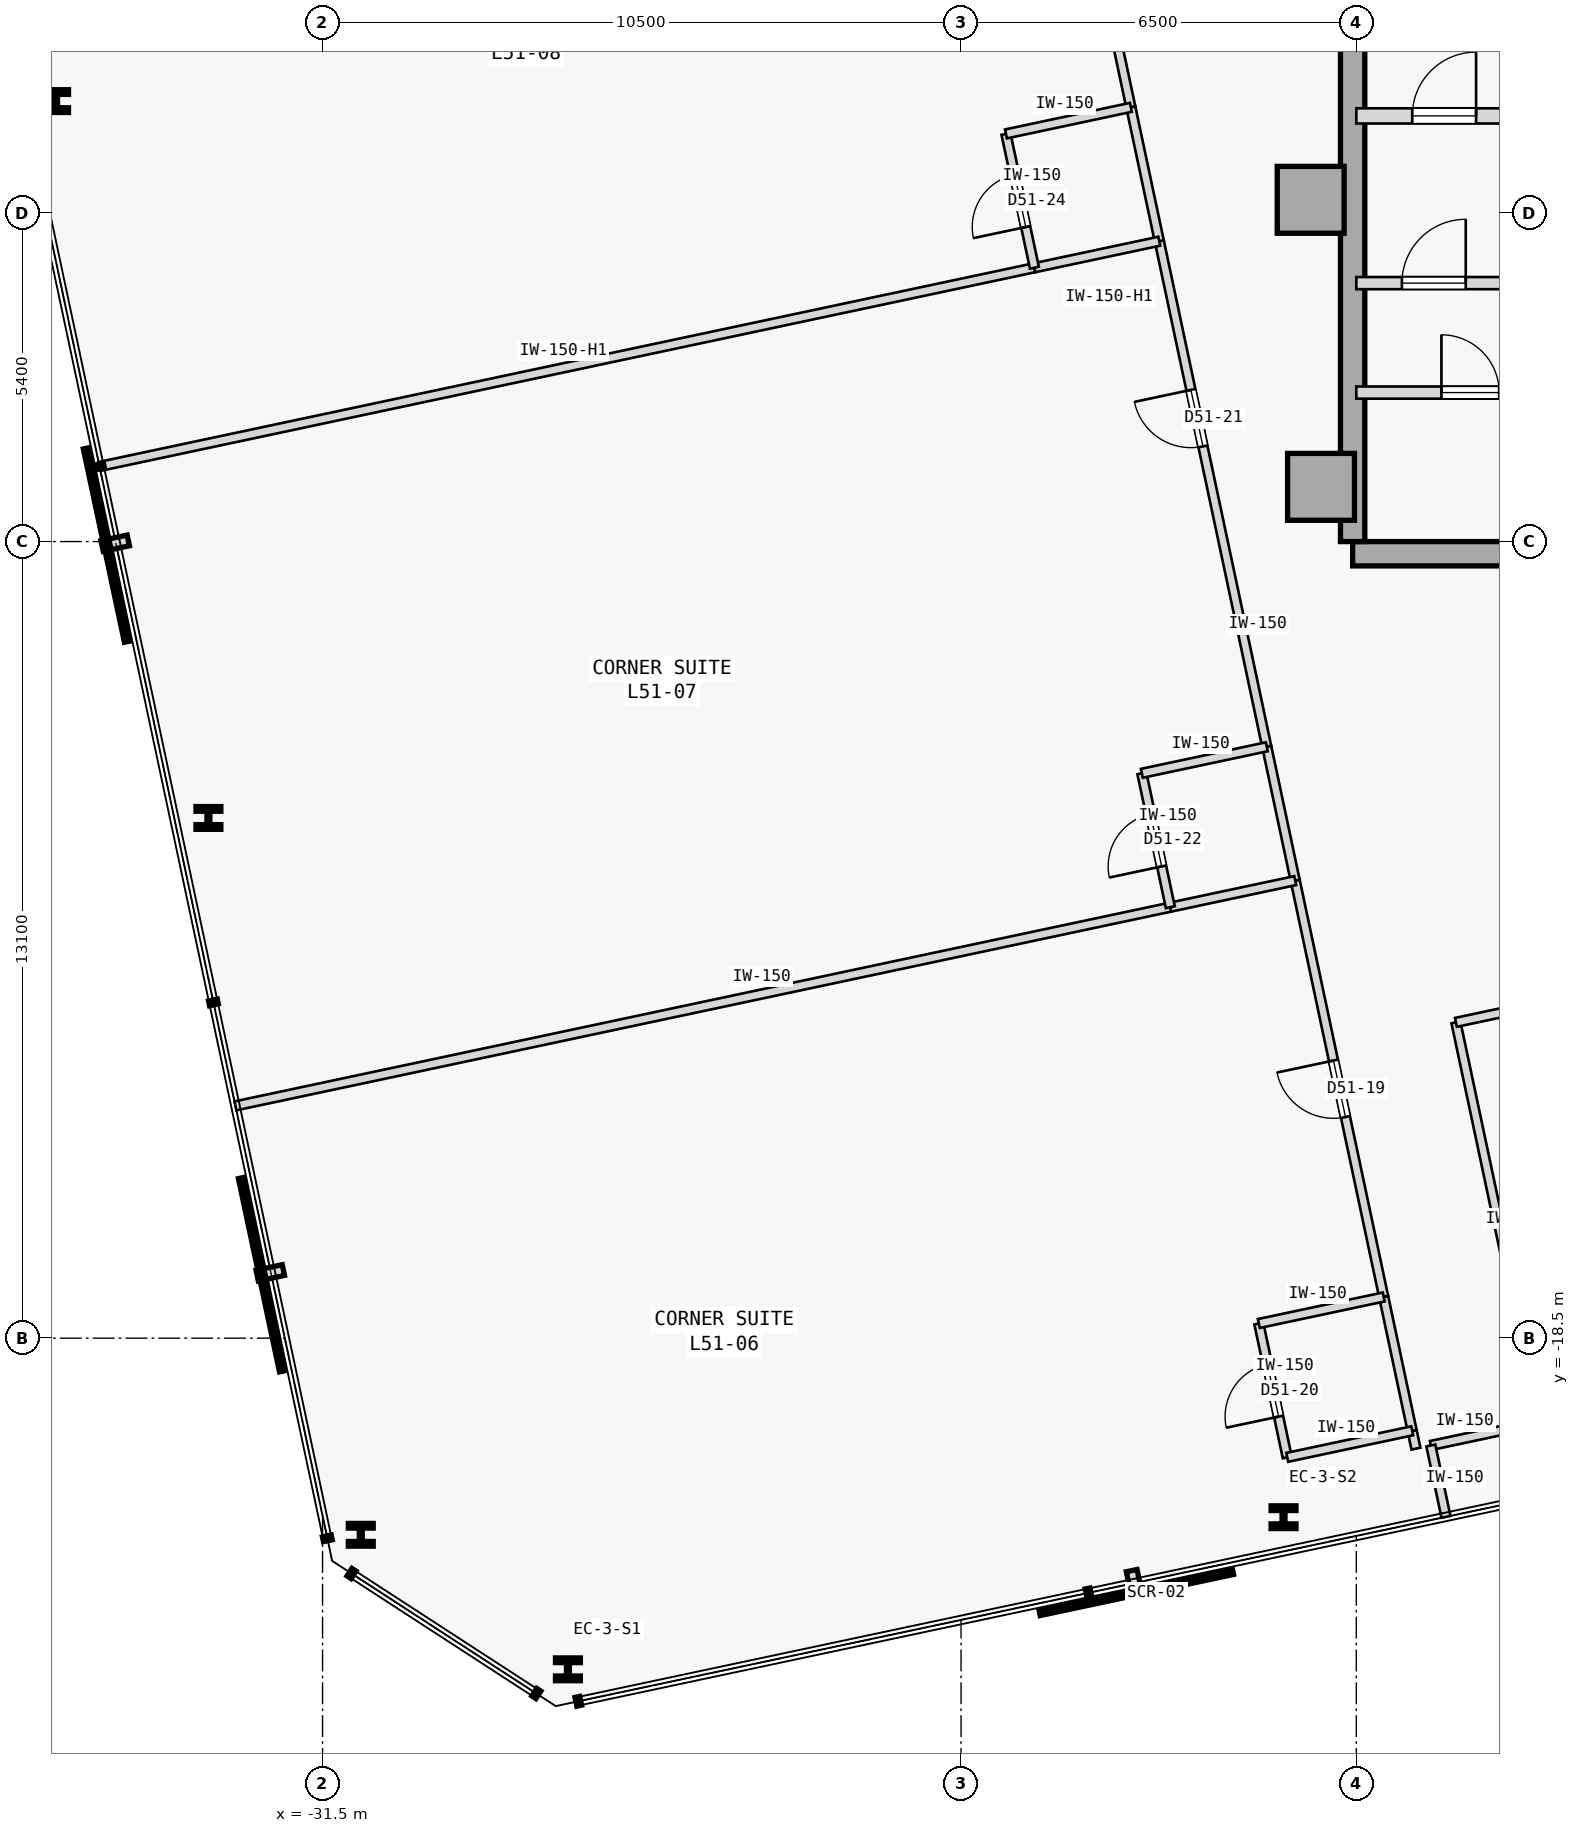
"""IFC4 building model, lengths in metres.
Left out: names, types, materials, properties, quantities, classifications, styles, units other than length and angle.
Written with IfcOpenShell. Run it as: python <this file> out.ifc"""

import sys

from ifc_helpers import new_model, si_unit, direction, frame, frame_2d, origin, origin_2d, place, context, subcontext, project, spatial, rectangle, i_section, extrude, element, fill, save


model = new_model("IFC4")
c1 = context("Model", 3, precision=1e-05, world=origin(), true_north=direction((0.0, 1.0)))
c2 = subcontext(c1, "Body", "Model", "MODEL_VIEW")
j1 = project(units=[si_unit("LENGTHUNIT", "METRE"), si_unit("PLANEANGLEUNIT", "RADIAN")], contexts=[c1])
p1 = place(None, origin())
s1 = spatial("IfcSite", under=j1, at=p1, CompositionType="ELEMENT")
p2 = place(p1, origin())
s2 = spatial("IfcBuilding", under=s1, at=p2, CompositionType="ELEMENT")
p3 = place(p2, frame((0.0, 0.0, 195.6)))
s3 = spatial("IfcBuildingStorey", under=s2, at=p3, CompositionType="ELEMENT", Elevation=195.6)
for number, where, z_axis, x_axis in (
    (1, (-15.25, 0.22, 0.0), (0.0, 0.0, 1.0), (1.0, 0.0, 0.0)),
    (2, (-15.08, -4.5, 0.0), (0.0, 0.0, 1.0), (1.0, 0.0, 0.0)),
):
    element("IfcColumn", number, at=place(p3, frame(where, z_axis=z_axis, x_axis=x_axis)), inside=s3, PredefinedType="COLUMN", context=c2, shape_type="SweptSolid", body=[
        extrude(rectangle(XDim=1.1, YDim=1.1, at=origin_2d()), origin(), (0.0, 0.0, 1.0), 3.4),
    ])
p4 = place(p3, frame((-14.56, -5.6, 0.0), z_axis=(0.0, 0.0, 1.0), x_axis=(1.0, 0.0, 0.0)))
e3 = element("IfcWall", 3, at=p4, inside=s3, PredefinedType="SHEAR", context=c2, shape_type="SweptSolid", body=[
    extrude(rectangle(XDim=10.86, YDim=0.4, at=frame_2d((5.43, 0.0))), origin(), (0.0, 0.0, 1.0), 3.175),
])
p5 = place(p3, frame((-14.56, -5.4, 0.0), z_axis=(0.0, 0.0, 1.0), x_axis=(0.0, 1.0, 0.0)))
e4 = element("IfcWall", 4, at=p5, inside=s3, PredefinedType="SHEAR", context=c2, shape_type="SweptSolid", body=[
    extrude(rectangle(XDim=10.8, YDim=0.4, at=frame_2d((5.4, 0.0))), origin(), (0.0, 0.0, 1.0), 3.175),
])
for number, where, z_axis, x_axis in (
    (5, (-27.465, -23.946, 0.0), (0.0, 0.0, 1.0), (1.0, 0.0, 0.0)),
    (6, (-15.697, -21.444, 0.0), (0.0, 0.0, 1.0), (1.0, 0.0, 0.0)),
    (7, (-35.883, 1.844, 0.0), (0.0, 0.0, 1.0), (1.0, 0.0, 0.0)),
    (8, (-33.377, -9.945, 0.0), (0.0, 0.0, 1.0), (1.0, 0.0, 0.0)),
    (9, (-30.871, -21.733, 0.0), (0.0, 0.0, 1.0), (1.0, 0.0, 0.0)),
):
    element("IfcColumn", number, at=place(p3, frame(where, z_axis=z_axis, x_axis=x_axis)), inside=s3, PredefinedType="COLUMN", context=c2, shape_type="SweptSolid", body=[
        extrude(i_section(OverallWidth=0.409, OverallDepth=0.374, WebThickness=0.048, FlangeThickness=0.077, FilletRadius=0.015, at=origin_2d()), origin(), (0.0, 0.0, 1.0), 3.4),
    ])
p6 = place(p3, frame((-14.5, 1.6, 0.0), z_axis=(0.0, 0.0, 1.0), x_axis=(1.0, 0.0, 0.0)))
e10 = element("IfcWall", 10, at=p6, inside=s3, PredefinedType="STANDARD", context=c2, shape_type="SweptSolid", body=[
    extrude(rectangle(XDim=3.6, YDim=0.25, at=frame_2d((1.8, 0.0))), origin(), (0.0, 0.0, 1.0), 3.175),
])
p7 = place(p6, frame((0.92, 0.0, 0.0)))
e11 = element("IfcOpeningElement", 11, at=p7, cuts=e10, PredefinedType="OPENING", context=c2, shape_type="SweptSolid", body=[
    extrude(rectangle(XDim=1.05, YDim=2.15, at=frame_2d((0.525, 1.075))), frame((0.0, 0.135, 0.0), z_axis=(0.0, -1.0, 0.0), x_axis=(1.0, 0.0, 0.0)), (0.0, 0.0, 1.0), 0.27),
])
p8 = place(p3, frame((-14.5, -1.15, 0.0), z_axis=(0.0, 0.0, 1.0), x_axis=(1.0, 0.0, 0.0)))
e12 = element("IfcWall", 12, at=p8, inside=s3, PredefinedType="STANDARD", context=c2, shape_type="SweptSolid", body=[
    extrude(rectangle(XDim=2.95, YDim=0.2, at=frame_2d((1.475, 0.0))), origin(), (0.0, 0.0, 1.0), 3.175),
])
p9 = place(p8, frame((0.75, 0.0, 0.0)))
e13 = element("IfcOpeningElement", 13, at=p9, cuts=e12, PredefinedType="OPENING", context=c2, shape_type="SweptSolid", body=[
    extrude(rectangle(XDim=1.05, YDim=2.18, at=frame_2d((0.525, 1.09))), frame((0.0, 0.11, 0.0), z_axis=(0.0, -1.0, 0.0), x_axis=(1.0, 0.0, 0.0)), (0.0, 0.0, 1.0), 0.22),
])
p10 = place(p3, frame((-14.5, -2.95, 0.0), z_axis=(0.0, 0.0, 1.0), x_axis=(1.0, 0.0, 0.0)))
e14 = element("IfcWall", 14, at=p10, inside=s3, PredefinedType="STANDARD", context=c2, shape_type="SweptSolid", body=[
    extrude(rectangle(XDim=10.8, YDim=0.2, at=frame_2d((5.4, 0.0))), origin(), (0.0, 0.0, 1.0), 3.175),
])
p11 = place(p10, frame((4.85, 0.0, 0.0)))
e15 = element("IfcOpeningElement", 15, at=p11, cuts=e14, PredefinedType="OPENING", context=c2, shape_type="SweptSolid", body=[
    extrude(rectangle(XDim=1.1, YDim=2.15, at=frame_2d((0.55, 1.075))), frame((0.0, 0.11, 0.0), z_axis=(0.0, -1.0, 0.0), x_axis=(1.0, 0.0, 0.0)), (0.0, 0.0, 1.0), 0.22),
])
p12 = place(p10, frame((7.01, 0.0, 0.0)))
e16 = element("IfcOpeningElement", 16, at=p12, cuts=e14, PredefinedType="OPENING", context=c2, shape_type="SweptSolid", body=[
    extrude(rectangle(XDim=1.1, YDim=2.15, at=frame_2d((0.55, 1.075))), frame((0.0, 0.11, 0.0), z_axis=(0.0, -1.0, 0.0), x_axis=(1.0, 0.0, 0.0)), (0.0, 0.0, 1.0), 0.22),
])
p13 = place(p10, frame((1.4, 0.0, 0.0)))
e17 = element("IfcOpeningElement", 17, at=p13, cuts=e14, PredefinedType="OPENING", context=c2, shape_type="SweptSolid", body=[
    extrude(rectangle(XDim=0.95, YDim=2.15, at=frame_2d((0.475, 1.075))), frame((0.0, 0.11, 0.0), z_axis=(0.0, -1.0, 0.0), x_axis=(1.0, 0.0, 0.0)), (0.0, 0.0, 1.0), 0.22),
])
p14 = place(p3, frame((-13.274, -20.265, 0.0), z_axis=(0.0, 0.0, 1.0), x_axis=(0.978160192495, 0.207852442415, 0.0)))
e18 = element("IfcWall", 18, at=p14, inside=s3, PredefinedType="PARTITIONING", context=c2, shape_type="SweptSolid", body=[
    extrude(rectangle(XDim=1.85, YDim=0.15, at=frame_2d((0.925, 0.0))), origin(), (0.0, 0.0, 1.0), 3.175),
])
p15 = place(p3, frame((-11.465, -19.88, 0.0), z_axis=(0.0, 0.0, 1.0), x_axis=(-0.207916109912, 0.978146661416, 0.0)))
e19 = element("IfcWall", 19, at=p15, inside=s3, PredefinedType="PARTITIONING", context=c2, shape_type="SweptSolid", body=[
    extrude(rectangle(XDim=6.72, YDim=0.15, at=frame_2d((3.36, 0.0))), origin(), (0.0, 0.0, 1.0), 3.175),
])
p16 = place(p3, frame((-12.862, -13.307, 0.0), z_axis=(0.0, 0.0, 1.0), x_axis=(0.978149904805, 0.207900850719, 0.0)))
e20 = element("IfcWall", 20, at=p16, inside=s3, PredefinedType="PARTITIONING", context=c2, shape_type="SweptSolid", body=[
    extrude(rectangle(XDim=9.156, YDim=0.15, at=frame_2d((4.578, 0.0))), origin(), (0.0, 0.0, 1.0), 3.175),
])
p17 = place(p16, frame((4.118, 0.0, 0.0)))
e21 = element("IfcOpeningElement", 21, at=p17, cuts=e20, PredefinedType="OPENING", context=c2, shape_type="SweptSolid", body=[
    extrude(rectangle(XDim=0.92, YDim=2.15, at=frame_2d((0.46, 1.075))), frame((0.0, 0.085, 0.0), z_axis=(0.0, -1.0, 0.0), x_axis=(1.0, 0.0, 0.0)), (0.0, 0.0, 1.0), 0.17),
])
p18 = place(p3, frame((-13.519, -20.317, 0.0), z_axis=(0.0, 0.0, 1.0), x_axis=(-0.207527808066, 0.978229118806, 0.0)))
e22 = element("IfcWall", 22, at=p18, inside=s3, PredefinedType="PARTITIONING", context=c2, shape_type="SweptSolid", body=[
    extrude(rectangle(XDim=0.3, YDim=0.15, at=frame_2d((0.15, 0.0))), origin(), (0.0, 0.0, 1.0), 3.175),
])
p19 = place(p3, frame((-14.049, -17.823, 0.0), z_axis=(0.0, 0.0, 1.0), x_axis=(-0.207940096132, 0.978141562567, 0.0)))
e23 = element("IfcWall", 23, at=p19, inside=s3, PredefinedType="PARTITIONING", context=c2, shape_type="SweptSolid", body=[
    extrude(rectangle(XDim=7.0, YDim=0.15, at=frame_2d((3.5, 0.0))), origin(), (0.0, 0.0, 1.0), 3.175),
])
p20 = place(p19, frame((3.025, 0.0, 0.0)))
e24 = element("IfcOpeningElement", 24, at=p20, cuts=e23, PredefinedType="OPENING", context=c2, shape_type="SweptSolid", body=[
    extrude(rectangle(XDim=0.95, YDim=2.15, at=frame_2d((0.475, 1.075))), frame((0.0, 0.085, 0.0), z_axis=(0.0, -1.0, 0.0), x_axis=(1.0, 0.0, 0.0)), (0.0, 0.0, 1.0), 0.17),
])
p21 = place(p3, frame((-13.581, -20.023, 0.0), z_axis=(0.0, 0.0, 1.0), x_axis=(-0.207891197838, 0.978151956427, 0.0)))
e25 = element("IfcWall", 25, at=p21, inside=s3, PredefinedType="PARTITIONING", context=c2, shape_type="SweptSolid", body=[
    extrude(rectangle(XDim=2.25, YDim=0.15, at=frame_2d((1.125, 0.0))), origin(), (0.0, 0.0, 1.0), 3.175),
])
p22 = place(p3, frame((-15.972, -8.775, 0.0), z_axis=(0.0, 0.0, 1.0), x_axis=(-0.207894825434, 0.97815118543, 0.0)))
e26 = element("IfcWall", 26, at=p22, inside=s3, PredefinedType="PARTITIONING", context=c2, shape_type="SweptSolid", body=[
    extrude(rectangle(XDim=8.5, YDim=0.15, at=frame_2d((4.25, 0.0))), origin(), (0.0, 0.0, 1.0), 3.175),
])
p23 = place(p22, frame((5.05, 0.0, 0.0)))
e27 = element("IfcOpeningElement", 27, at=p23, cuts=e26, PredefinedType="OPENING", context=c2, shape_type="SweptSolid", body=[
    extrude(rectangle(XDim=0.95, YDim=2.15, at=frame_2d((0.475, 1.075))), frame((0.0, 0.085, 0.0), z_axis=(0.0, -1.0, 0.0), x_axis=(1.0, 0.0, 0.0)), (0.0, 0.0, 1.0), 0.17),
])
p24 = place(p3, frame((-15.504, -10.976, 0.0), z_axis=(0.0, 0.0, 1.0), x_axis=(-0.207891197838, 0.978151956427, 0.0)))
e28 = element("IfcWall", 28, at=p24, inside=s3, PredefinedType="PARTITIONING", context=c2, shape_type="SweptSolid", body=[
    extrude(rectangle(XDim=2.25, YDim=0.15, at=frame_2d((1.125, 0.0))), origin(), (0.0, 0.0, 1.0), 3.175),
])
p25 = place(p3, frame((-18.207, 1.74, 0.0), z_axis=(0.0, 0.0, 1.0), x_axis=(-0.207922306475, 0.978145344246, 0.0)))
e29 = element("IfcWall", 29, at=p25, inside=s3, PredefinedType="PARTITIONING", context=c2, shape_type="SweptSolid", body=[
    extrude(rectangle(XDim=8.5, YDim=0.15, at=frame_2d((4.25, 0.0))), origin(), (0.0, 0.0, 1.0), 3.175),
])
p26 = place(p25, frame((3.775, 0.0, 0.0)))
e30 = element("IfcOpeningElement", 30, at=p26, cuts=e29, PredefinedType="OPENING", context=c2, shape_type="SweptSolid", body=[
    extrude(rectangle(XDim=0.95, YDim=2.15, at=frame_2d((0.475, 1.075))), frame((0.0, 0.085, 0.0), z_axis=(0.0, -1.0, 0.0), x_axis=(1.0, 0.0, 0.0)), (0.0, 0.0, 1.0), 0.17),
])
p27 = place(p3, frame((-17.739, -0.46, 0.0), z_axis=(0.0, 0.0, 1.0), x_axis=(-0.207891197838, 0.978151956427, 0.0)))
e31 = element("IfcWall", 31, at=p27, inside=s3, PredefinedType="PARTITIONING", context=c2, shape_type="SweptSolid", body=[
    extrude(rectangle(XDim=2.25, YDim=0.15, at=frame_2d((1.125, 0.0))), origin(), (0.0, 0.0, 1.0), 3.175),
])
p28 = place(p3, frame((-13.025, -21.439, 0.0), z_axis=(0.0, 0.0, 1.0), x_axis=(-0.207917150959, 0.978146440129, 0.0)))
e32 = element("IfcWall", 32, at=p28, inside=s3, PredefinedType="PARTITIONING", context=c2, shape_type="SweptSolid", body=[
    extrude(rectangle(XDim=1.2, YDim=0.15, at=frame_2d((0.6, 0.0))), origin(), (0.0, 0.0, 1.0), 3.175),
])
p29 = place(p3, frame((-15.635, -20.46, 0.0), z_axis=(0.0, 0.0, 1.0), x_axis=(-0.207913264065, 0.978147266328, 0.0)))
e33 = element("IfcWall", 33, at=p29, inside=s3, PredefinedType="PARTITIONING", context=c2, shape_type="SweptSolid", body=[
    extrude(rectangle(XDim=2.25, YDim=0.15, at=frame_2d((1.125, 0.0))), origin(), (0.0, 0.0, 1.0), 3.175),
])
p30 = place(p29, frame((0.685, 0.0, 0.0)))
e34 = element("IfcOpeningElement", 34, at=p30, cuts=e33, PredefinedType="OPENING", context=c2, shape_type="SweptSolid", body=[
    extrude(rectangle(XDim=0.88, YDim=2.15, at=frame_2d((0.44, 1.075))), frame((0.0, 0.085, 0.0), z_axis=(0.0, -1.0, 0.0), x_axis=(1.0, 0.0, 0.0)), (0.0, 0.0, 1.0), 0.17),
])
for number, where, z_axis, x_axis in (
    (35, (-15.635, -20.46, 0.0), (0.0, 0.0, 1.0), (0.978, 0.208, 0.0)),
    (36, (-16.103, -18.259, 0.0), (0.0, 0.0, 1.0), (0.978, 0.208, 0.0)),
):
    element("IfcWall", number, at=place(p3, frame(where, z_axis=z_axis, x_axis=x_axis)), inside=s3, PredefinedType="PARTITIONING", context=c2, shape_type="SweptSolid", body=[
        extrude(rectangle(XDim=2.1, YDim=0.15, at=frame_2d((1.05, 0.0))), origin(), (0.0, 0.0, 1.0), 3.175),
    ])
p31 = place(p3, frame((-32.933, -14.68, 0.0), z_axis=(0.0, 0.0, 1.0), x_axis=(0.978146137903, 0.207918572776, 0.0)))
e37 = element("IfcWall", 37, at=p31, inside=s3, PredefinedType="PARTITIONING", context=c2, shape_type="SweptSolid", body=[
    extrude(rectangle(XDim=15.718, YDim=0.15, at=frame_2d((7.859, 0.0))), origin(), (0.0, 0.0, 1.0), 3.175),
])
p32 = place(p3, frame((-17.558, -11.412, 0.0), z_axis=(0.0, 0.0, 1.0), x_axis=(0.978153236239, 0.207885176084, 0.0)))
e38 = element("IfcWall", 38, at=p32, inside=s3, PredefinedType="PARTITIONING", context=c2, shape_type="SweptSolid", body=[
    extrude(rectangle(XDim=2.1, YDim=0.15, at=frame_2d((1.05, 0.0))), origin(), (0.0, 0.0, 1.0), 3.175),
])
p33 = place(p3, frame((-17.558, -11.412, 0.0), z_axis=(0.0, 0.0, 1.0), x_axis=(-0.207891197838, 0.978151956427, 0.0)))
e39 = element("IfcWall", 39, at=p33, inside=s3, PredefinedType="PARTITIONING", context=c2, shape_type="SweptSolid", body=[
    extrude(rectangle(XDim=2.25, YDim=0.15, at=frame_2d((1.125, 0.0))), origin(), (0.0, 0.0, 1.0), 3.175),
])
p34 = place(p33, frame((0.685, 0.0, 0.0)))
e40 = element("IfcOpeningElement", 40, at=p34, cuts=e39, PredefinedType="OPENING", context=c2, shape_type="SweptSolid", body=[
    extrude(rectangle(XDim=0.88, YDim=2.15, at=frame_2d((0.44, 1.075))), frame((0.0, 0.085, 0.0), z_axis=(0.0, -1.0, 0.0), x_axis=(1.0, 0.0, 0.0)), (0.0, 0.0, 1.0), 0.17),
])
p35 = place(p3, frame((-18.026, -9.211, 0.0), z_axis=(0.0, 0.0, 1.0), x_axis=(0.978153236239, 0.207885176084, 0.0)))
e41 = element("IfcWall", 41, at=p35, inside=s3, PredefinedType="PARTITIONING", context=c2, shape_type="SweptSolid", body=[
    extrude(rectangle(XDim=2.1, YDim=0.15, at=frame_2d((1.05, 0.0))), origin(), (0.0, 0.0, 1.0), 3.175),
])
p36 = place(p3, frame((-35.168, -4.165, 0.0), z_axis=(0.0, 0.0, 1.0), x_axis=(0.978149296727, 0.207903711638, 0.0)))
e42 = element("IfcWall", 42, at=p36, inside=s3, PredefinedType="PARTITIONING", context=c2, shape_type="SweptSolid", body=[
    extrude(rectangle(XDim=15.718, YDim=0.15, at=frame_2d((7.859, 0.0))), origin(), (0.0, 0.0, 1.0), 2.725),
])
p37 = place(p3, frame((-19.793, -0.897, 0.0), z_axis=(0.0, 0.0, 1.0), x_axis=(0.978134617382, 0.207972763311, 0.0)))
e43 = element("IfcWall", 43, at=p37, inside=s3, PredefinedType="PARTITIONING", context=c2, shape_type="SweptSolid", body=[
    extrude(rectangle(XDim=2.1, YDim=0.15, at=frame_2d((1.05, 0.0))), origin(), (0.0, 0.0, 1.0), 2.725),
])
p38 = place(p3, frame((-19.793, -0.897, 0.0), z_axis=(0.0, 0.0, 1.0), x_axis=(-0.207891197838, 0.978151956427, 0.0)))
e44 = element("IfcWall", 44, at=p38, inside=s3, PredefinedType="PARTITIONING", context=c2, shape_type="SweptSolid", body=[
    extrude(rectangle(XDim=2.25, YDim=0.15, at=frame_2d((1.125, 0.0))), origin(), (0.0, 0.0, 1.0), 3.175),
])
p39 = place(p38, frame((0.685, 0.0, 0.0)))
e45 = element("IfcOpeningElement", 45, at=p39, cuts=e44, PredefinedType="OPENING", context=c2, shape_type="SweptSolid", body=[
    extrude(rectangle(XDim=0.88, YDim=2.15, at=frame_2d((0.44, 1.075))), frame((0.0, 0.085, 0.0), z_axis=(0.0, -1.0, 0.0), x_axis=(1.0, 0.0, 0.0)), (0.0, 0.0, 1.0), 0.17),
])
p40 = place(p3, frame((-20.261, 1.304, 0.0), z_axis=(0.0, 0.0, 1.0), x_axis=(0.978134617382, 0.207972763311, 0.0)))
e46 = element("IfcWall", 46, at=p40, inside=s3, PredefinedType="PARTITIONING", context=c2, shape_type="SweptSolid", body=[
    extrude(rectangle(XDim=2.1, YDim=0.15, at=frame_2d((1.05, 0.0))), origin(), (0.0, 0.0, 1.0), 3.175),
])
p41 = place(p7, origin())
e47 = element("IfcDoor", 47, at=p41, inside=s3, OperationType="SINGLE_SWING_RIGHT", PredefinedType="DOOR", context=c2, shape_type="SweptSolid", body=[
    extrude(rectangle(XDim=1.05, YDim=2.15, at=frame_2d((0.525, 1.075))), frame((0.0, 0.025, 0.0), z_axis=(0.0, -1.0, 0.0), x_axis=(1.0, 0.0, 0.0)), (0.0, 0.0, 1.0), 0.05),
])
fill(e11, e47)
p42 = place(p9, origin())
e48 = element("IfcDoor", 48, at=p42, inside=s3, OperationType="SINGLE_SWING_RIGHT", PredefinedType="DOOR", context=c2, shape_type="SweptSolid", body=[
    extrude(rectangle(XDim=1.05, YDim=2.18, at=frame_2d((0.525, 1.09))), frame((0.0, 0.025, 0.0), z_axis=(0.0, -1.0, 0.0), x_axis=(1.0, 0.0, 0.0)), (0.0, 0.0, 1.0), 0.05),
])
fill(e13, e48)
p43 = place(p13, origin())
e49 = element("IfcDoor", 49, at=p43, inside=s3, OperationType="SINGLE_SWING_LEFT", PredefinedType="DOOR", context=c2, shape_type="SweptSolid", body=[
    extrude(rectangle(XDim=0.95, YDim=2.15, at=frame_2d((0.475, 1.075))), frame((0.0, 0.025, 0.0), z_axis=(0.0, -1.0, 0.0), x_axis=(1.0, 0.0, 0.0)), (0.0, 0.0, 1.0), 0.05),
])
fill(e17, e49)
p44 = place(p20, origin())
e50 = element("IfcDoor", 50, at=p44, inside=s3, OperationType="SINGLE_SWING_RIGHT", PredefinedType="DOOR", context=c2, shape_type="SweptSolid", body=[
    extrude(rectangle(XDim=0.95, YDim=2.15, at=frame_2d((0.475, 1.075))), frame((0.0, 0.025, 0.0), z_axis=(0.0, -1.0, 0.0), x_axis=(1.0, 0.0, 0.0)), (0.0, 0.0, 1.0), 0.05),
])
fill(e24, e50)
p45 = place(p30, origin())
e51 = element("IfcDoor", 51, at=p45, inside=s3, OperationType="SINGLE_SWING_LEFT", PredefinedType="DOOR", context=c2, shape_type="SweptSolid", body=[
    extrude(rectangle(XDim=0.88, YDim=2.15, at=frame_2d((0.44, 1.075))), frame((0.0, 0.025, 0.0), z_axis=(0.0, -1.0, 0.0), x_axis=(1.0, 0.0, 0.0)), (0.0, 0.0, 1.0), 0.05),
])
fill(e34, e51)
p46 = place(p23, origin())
e52 = element("IfcDoor", 52, at=p46, inside=s3, OperationType="SINGLE_SWING_RIGHT", PredefinedType="DOOR", context=c2, shape_type="SweptSolid", body=[
    extrude(rectangle(XDim=0.95, YDim=2.15, at=frame_2d((0.475, 1.075))), frame((0.0, 0.025, 0.0), z_axis=(0.0, -1.0, 0.0), x_axis=(1.0, 0.0, 0.0)), (0.0, 0.0, 1.0), 0.05),
])
fill(e27, e52)
p47 = place(p34, origin())
e53 = element("IfcDoor", 53, at=p47, inside=s3, OperationType="SINGLE_SWING_LEFT", PredefinedType="DOOR", context=c2, shape_type="SweptSolid", body=[
    extrude(rectangle(XDim=0.88, YDim=2.15, at=frame_2d((0.44, 1.075))), frame((0.0, 0.025, 0.0), z_axis=(0.0, -1.0, 0.0), x_axis=(1.0, 0.0, 0.0)), (0.0, 0.0, 1.0), 0.05),
])
fill(e40, e53)
p48 = place(p39, origin())
e54 = element("IfcDoor", 54, at=p48, inside=s3, OperationType="SINGLE_SWING_LEFT", PredefinedType="DOOR", context=c2, shape_type="SweptSolid", body=[
    extrude(rectangle(XDim=0.88, YDim=2.15, at=frame_2d((0.44, 1.075))), frame((0.0, 0.025, 0.0), z_axis=(0.0, -1.0, 0.0), x_axis=(1.0, 0.0, 0.0)), (0.0, 0.0, 1.0), 0.05),
])
fill(e45, e54)
save(model, sys.argv[1])
